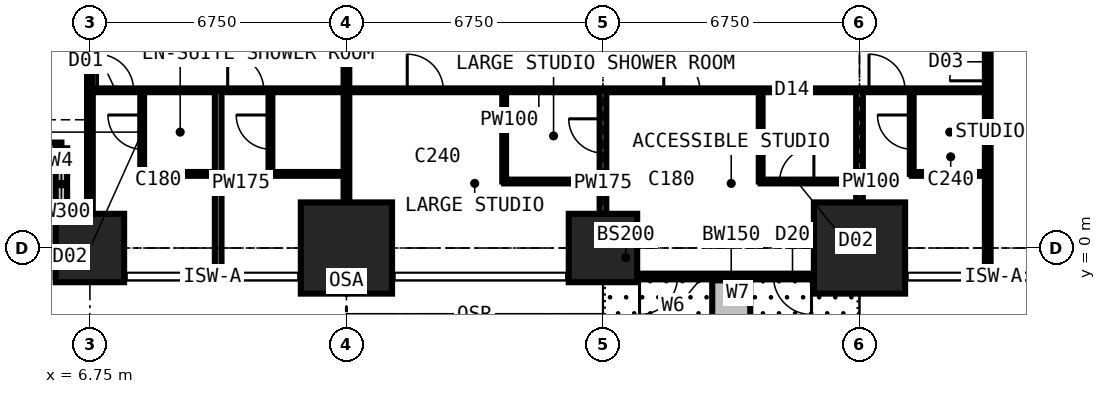
"""IFC4 building model, lengths in metres.
Left out: names, types, materials, properties, quantities, classifications, styles, units other than length and angle.
Written with IfcOpenShell. Run it as: python <this file> out.ifc"""

import sys

from ifc_helpers import new_model, si_unit, direction, frame, frame_2d, origin, origin_2d, place, context, subcontext, project, spatial, rectangle, extrude, element, fill, save


model = new_model("IFC4")
c1 = context("Model", 3, precision=1e-05, world=origin(), true_north=direction((0.0, 1.0)))
c2 = subcontext(c1, "Body", "Model", "MODEL_VIEW")
j1 = project(units=[si_unit("LENGTHUNIT", "METRE"), si_unit("PLANEANGLEUNIT", "RADIAN")], contexts=[c1])
p1 = place(None, origin())
s1 = spatial("IfcSite", under=j1, at=p1, CompositionType="ELEMENT")
p2 = place(p1, origin())
s2 = spatial("IfcBuilding", under=s1, at=p2, CompositionType="ELEMENT")
p3 = place(p2, frame((0.0, 0.0, 72.0)))
s3 = spatial("IfcBuildingStorey", under=s2, at=p3, CompositionType="ELEMENT", Elevation=72.0)
p4 = place(p3, frame((6.75, 0.0, 0.0), z_axis=(0.0, 0.0, 1.0), x_axis=(1.0, 0.0, 0.0)))
e1 = element("IfcColumn", 1, at=p4, inside=s3, PredefinedType="COLUMN", context=c2, shape_type="SweptSolid", body=[
    extrude(rectangle(XDim=1.8, YDim=1.8, at=origin_2d()), origin(), (0.0, 0.0, 1.0), 3.6),
])
p5 = place(p3, frame((13.5, 0.0, 0.0), z_axis=(0.0, 0.0, 1.0), x_axis=(1.0, 0.0, 0.0)))
e2 = element("IfcColumn", 2, at=p5, inside=s3, PredefinedType="COLUMN", context=c2, shape_type="SweptSolid", body=[
    extrude(rectangle(XDim=2.4, YDim=2.4, at=origin_2d()), origin(), (0.0, 0.0, 1.0), 3.6),
])
p6 = place(p3, frame((20.25, 0.0, 0.0), z_axis=(0.0, 0.0, 1.0), x_axis=(1.0, 0.0, 0.0)))
e3 = element("IfcColumn", 3, at=p6, inside=s3, PredefinedType="COLUMN", context=c2, shape_type="SweptSolid", body=[
    extrude(rectangle(XDim=1.8, YDim=1.8, at=origin_2d()), origin(), (0.0, 0.0, 1.0), 3.6),
])
p7 = place(p3, frame((27.0, 0.0, 0.0), z_axis=(0.0, 0.0, 1.0), x_axis=(1.0, 0.0, 0.0)))
e4 = element("IfcColumn", 4, at=p7, inside=s3, PredefinedType="COLUMN", context=c2, shape_type="SweptSolid", body=[
    extrude(rectangle(XDim=2.4, YDim=2.4, at=origin_2d()), origin(), (0.0, 0.0, 1.0), 3.6),
])
p8 = place(p3, frame((2.625, 2.625, 0.0), z_axis=(0.0, 0.0, 1.0), x_axis=(1.0, 0.0, 0.0)))
e5 = element("IfcWall", 5, at=p8, inside=s3, PredefinedType="SOLIDWALL", context=c2, shape_type="SweptSolid", body=[
    extrude(rectangle(XDim=3.375, YDim=0.3, at=frame_2d((1.688, 0.0))), origin(), (0.0, 0.0, 1.0), 3.3),
])
p9 = place(p8, frame((0.788, 0.0, 0.6)))
e6 = element("IfcOpeningElement", 6, at=p9, cuts=e5, PredefinedType="OPENING", context=c2, shape_type="SweptSolid", body=[
    extrude(rectangle(XDim=1.8, YDim=2.1, at=frame_2d((0.9, 1.05))), frame((0.0, 0.16, 0.0), z_axis=(0.0, -1.0, 0.0), x_axis=(1.0, 0.0, 0.0)), (0.0, 0.0, 1.0), 0.32),
])
p10 = place(p3, frame((6.0, 2.625, 0.0), z_axis=(0.0, 0.0, 1.0), x_axis=(0.0, -1.0, 0.0)))
e7 = element("IfcWall", 7, at=p10, inside=s3, PredefinedType="SOLIDWALL", context=c2, shape_type="SweptSolid", body=[
    extrude(rectangle(XDim=3.375, YDim=0.3, at=frame_2d((1.688, 0.0))), origin(), (0.0, 0.0, 1.0), 3.3),
])
p11 = place(p10, frame((0.343, 0.0, 0.9)))
e8 = element("IfcOpeningElement", 8, at=p11, cuts=e7, PredefinedType="OPENING", context=c2, shape_type="SweptSolid", body=[
    extrude(rectangle(XDim=1.2, YDim=1.8, at=frame_2d((0.6, 0.9))), frame((0.0, 0.16, 0.0), z_axis=(0.0, -1.0, 0.0), x_axis=(1.0, 0.0, 0.0)), (0.0, 0.0, 1.0), 0.32),
])
p12 = place(p3, frame((27.0, -0.75, 0.0), z_axis=(0.0, 0.0, 1.0), x_axis=(-1.0, 0.0, 0.0)))
e9 = element("IfcWall", 9, at=p12, inside=s3, PredefinedType="SOLIDWALL", context=c2, shape_type="SweptSolid", body=[
    extrude(rectangle(XDim=6.75, YDim=0.15, at=frame_2d((3.375, 0.0))), origin(), (0.0, 0.0, 1.0), 3.3),
])
p13 = place(p12, frame((1.262, 0.0, 0.0)))
e10 = element("IfcOpeningElement", 10, at=p13, cuts=e9, PredefinedType="OPENING", context=c2, shape_type="SweptSolid", body=[
    extrude(rectangle(XDim=1.0, YDim=2.2, at=frame_2d((0.5, 1.1))), frame((0.0, 0.085, 0.0), z_axis=(0.0, -1.0, 0.0), x_axis=(1.0, 0.0, 0.0)), (0.0, 0.0, 1.0), 0.17),
])
p14 = place(p12, frame((2.325, 0.0, 0.9)))
e11 = element("IfcOpeningElement", 11, at=p14, cuts=e9, PredefinedType="OPENING", context=c2, shape_type="SweptSolid", body=[
    extrude(rectangle(XDim=0.9, YDim=1.8, at=frame_2d((0.45, 0.9))), frame((0.0, 0.085, 0.0), z_axis=(0.0, -1.0, 0.0), x_axis=(1.0, 0.0, 0.0)), (0.0, 0.0, 1.0), 0.17),
])
p15 = place(p12, frame((4.788, 0.0, 0.0)))
e12 = element("IfcOpeningElement", 12, at=p15, cuts=e9, PredefinedType="OPENING", context=c2, shape_type="SweptSolid", body=[
    extrude(rectangle(XDim=1.0, YDim=2.2, at=frame_2d((0.5, 1.1))), frame((0.0, 0.085, 0.0), z_axis=(0.0, -1.0, 0.0), x_axis=(1.0, 0.0, 0.0)), (0.0, 0.0, 1.0), 0.17),
])
p16 = place(p12, frame((3.525, 0.0, 0.9)))
e13 = element("IfcOpeningElement", 13, at=p16, cuts=e9, PredefinedType="OPENING", context=c2, shape_type="SweptSolid", body=[
    extrude(rectangle(XDim=1.2, YDim=1.8, at=frame_2d((0.6, 0.9))), frame((0.0, 0.085, 0.0), z_axis=(0.0, -1.0, 0.0), x_axis=(1.0, 0.0, 0.0)), (0.0, 0.0, 1.0), 0.17),
])
p17 = place(p3, frame((23.625, -0.85, 0.0), z_axis=(0.0, 0.0, 1.0), x_axis=(0.0, -1.0, 0.0)))
e14 = element("IfcWall", 14, at=p17, inside=s3, PredefinedType="USERDEFINED", context=c2, shape_type="SweptSolid", body=[
    extrude(rectangle(XDim=2.2, YDim=1.0, at=frame_2d((1.1, 0.0))), origin(), (0.0, 0.0, 1.0), 0.9),
])
p18 = place(p3, frame((6.75, -0.734, 0.0), z_axis=(0.0, 0.0, 1.0), x_axis=(0.0, 1.0, 0.0)))
e15 = element("IfcWall", 15, at=p18, inside=s3, PredefinedType="PARTITIONING", context=c2, shape_type="SweptSolid", body=[
    extrude(rectangle(XDim=10.859, YDim=0.15, at=frame_2d((5.429, 0.0))), origin(), (0.0, 0.0, 1.0), 2.802),
])
p19 = place(p3, frame((6.75, 4.15, 0.0), z_axis=(0.0, 0.0, 1.0), x_axis=(1.0, 0.0, 0.0)))
e16 = element("IfcWall", 16, at=p19, inside=s3, PredefinedType="PARTITIONING", context=c2, shape_type="SweptSolid", body=[
    extrude(rectangle(XDim=23.625, YDim=0.1, at=frame_2d((11.812, 0.0))), origin(), (0.0, 0.0, 1.0), 3.3),
])
p20 = place(p19, frame((0.2, 0.0, 0.0)))
e17 = element("IfcOpeningElement", 17, at=p20, cuts=e16, PredefinedType="OPENING", context=c2, shape_type="SweptSolid", body=[
    extrude(rectangle(XDim=0.95, YDim=2.2, at=frame_2d((0.475, 1.1))), frame((0.0, 0.06, 0.0), z_axis=(0.0, -1.0, 0.0), x_axis=(1.0, 0.0, 0.0)), (0.0, 0.0, 1.0), 0.12),
])
p21 = place(p19, frame((3.625, 0.0, 0.0)))
e18 = element("IfcOpeningElement", 18, at=p21, cuts=e16, PredefinedType="OPENING", context=c2, shape_type="SweptSolid", body=[
    extrude(rectangle(XDim=0.95, YDim=2.2, at=frame_2d((0.475, 1.1))), frame((0.0, 0.06, 0.0), z_axis=(0.0, -1.0, 0.0), x_axis=(1.0, 0.0, 0.0)), (0.0, 0.0, 1.0), 0.12),
])
p22 = place(p19, frame((15.1, 0.0, 0.0)))
e19 = element("IfcOpeningElement", 19, at=p22, cuts=e16, PredefinedType="OPENING", context=c2, shape_type="SweptSolid", body=[
    extrude(rectangle(XDim=0.95, YDim=2.2, at=frame_2d((0.475, 1.1))), frame((0.0, 0.06, 0.0), z_axis=(0.0, -1.0, 0.0), x_axis=(1.0, 0.0, 0.0)), (0.0, 0.0, 1.0), 0.12),
])
p23 = place(p19, frame((8.35, 0.0, 0.0)))
e20 = element("IfcOpeningElement", 20, at=p23, cuts=e16, PredefinedType="OPENING", context=c2, shape_type="SweptSolid", body=[
    extrude(rectangle(XDim=0.95, YDim=2.2, at=frame_2d((0.475, 1.1))), frame((0.0, 0.06, 0.0), z_axis=(0.0, -1.0, 0.0), x_axis=(1.0, 0.0, 0.0)), (0.0, 0.0, 1.0), 0.12),
])
p24 = place(p19, frame((20.5, 0.0, 0.0)))
e21 = element("IfcOpeningElement", 21, at=p24, cuts=e16, PredefinedType="OPENING", context=c2, shape_type="SweptSolid", body=[
    extrude(rectangle(XDim=0.95, YDim=2.2, at=frame_2d((0.475, 1.1))), frame((0.0, 0.06, 0.0), z_axis=(0.0, -1.0, 0.0), x_axis=(1.0, 0.0, 0.0)), (0.0, 0.0, 1.0), 0.12),
])
p25 = place(p3, frame((8.125, 1.95, 0.0), z_axis=(0.0, 0.0, 1.0), x_axis=(0.0, 1.0, 0.0)))
e22 = element("IfcWall", 22, at=p25, inside=s3, PredefinedType="PARTITIONING", context=c2, shape_type="SweptSolid", body=[
    extrude(rectangle(XDim=2.2, YDim=0.1, at=frame_2d((1.1, 0.0))), origin(), (0.0, 0.0, 1.0), 3.3),
])
p26 = place(p25, frame((0.65, 0.0, 0.0)))
e23 = element("IfcOpeningElement", 23, at=p26, cuts=e22, PredefinedType="OPENING", context=c2, shape_type="SweptSolid", body=[
    extrude(rectangle(XDim=0.9, YDim=2.2, at=frame_2d((0.45, 1.1))), frame((0.0, 0.06, 0.0), z_axis=(0.0, -1.0, 0.0), x_axis=(1.0, 0.0, 0.0)), (0.0, 0.0, 1.0), 0.12),
])
p27 = place(p3, frame((8.125, 1.95, 0.0), z_axis=(0.0, 0.0, 1.0), x_axis=(1.0, 0.0, 0.0)))
e24 = element("IfcWall", 24, at=p27, inside=s3, PredefinedType="PARTITIONING", context=c2, shape_type="SweptSolid", body=[
    extrude(rectangle(XDim=2.0, YDim=0.1, at=frame_2d((1.0, 0.0))), origin(), (0.0, 0.0, 1.0), 3.3),
])
p28 = place(p3, frame((10.125, -0.734, 0.0), z_axis=(0.0, 0.0, 1.0), x_axis=(0.0, 1.0, 0.0)))
e25 = element("IfcWall", 25, at=p28, inside=s3, PredefinedType="PARTITIONING", context=c2, shape_type="SweptSolid", body=[
    extrude(rectangle(XDim=4.884, YDim=0.175, at=frame_2d((2.442, 0.0))), origin(), (0.0, 0.0, 1.0), 3.3),
])
p29 = place(p3, frame((11.5, 1.95, 0.0), z_axis=(0.0, 0.0, 1.0), x_axis=(0.0, 1.0, 0.0)))
e26 = element("IfcWall", 26, at=p29, inside=s3, PredefinedType="PARTITIONING", context=c2, shape_type="SweptSolid", body=[
    extrude(rectangle(XDim=2.2, YDim=0.1, at=frame_2d((1.1, 0.0))), origin(), (0.0, 0.0, 1.0), 3.3),
])
p30 = place(p29, frame((0.65, 0.0, 0.0)))
e27 = element("IfcOpeningElement", 27, at=p30, cuts=e26, PredefinedType="OPENING", context=c2, shape_type="SweptSolid", body=[
    extrude(rectangle(XDim=0.9, YDim=2.2, at=frame_2d((0.45, 1.1))), frame((0.0, 0.06, 0.0), z_axis=(0.0, -1.0, 0.0), x_axis=(1.0, 0.0, 0.0)), (0.0, 0.0, 1.0), 0.12),
])
p31 = place(p3, frame((11.5, 1.95, 0.0), z_axis=(0.0, 0.0, 1.0), x_axis=(1.0, 0.0, 0.0)))
e28 = element("IfcWall", 28, at=p31, inside=s3, PredefinedType="PARTITIONING", context=c2, shape_type="SweptSolid", body=[
    extrude(rectangle(XDim=2.0, YDim=0.1, at=frame_2d((1.0, 0.0))), origin(), (0.0, 0.0, 1.0), 3.3),
])
p32 = place(p3, frame((13.5, -0.734, 0.0), z_axis=(0.0, 0.0, 1.0), x_axis=(0.0, 1.0, 0.0)))
e29 = element("IfcWall", 29, at=p32, inside=s3, PredefinedType="PARTITIONING", context=c2, shape_type="SweptSolid", body=[
    extrude(rectangle(XDim=12.034, YDim=0.15, at=frame_2d((6.017, 0.0))), origin(), (0.0, 0.0, 1.0), 2.802),
])
p33 = place(p3, frame((17.65, 1.75, 0.0), z_axis=(0.0, 0.0, 1.0), x_axis=(0.0, 1.0, 0.0)))
e30 = element("IfcWall", 30, at=p33, inside=s3, PredefinedType="PARTITIONING", context=c2, shape_type="SweptSolid", body=[
    extrude(rectangle(XDim=2.4, YDim=0.1, at=frame_2d((1.2, 0.0))), origin(), (0.0, 0.0, 1.0), 3.3),
])
p34 = place(p3, frame((17.65, 1.75, 0.0), z_axis=(0.0, 0.0, 1.0), x_axis=(1.0, 0.0, 0.0)))
e31 = element("IfcWall", 31, at=p34, inside=s3, PredefinedType="PARTITIONING", context=c2, shape_type="SweptSolid", body=[
    extrude(rectangle(XDim=2.6, YDim=0.1, at=frame_2d((1.3, 0.0))), origin(), (0.0, 0.0, 1.0), 3.3),
])
p35 = place(p3, frame((20.25, -0.734, 0.0), z_axis=(0.0, 0.0, 1.0), x_axis=(0.0, 1.0, 0.0)))
e32 = element("IfcWall", 32, at=p35, inside=s3, PredefinedType="PARTITIONING", context=c2, shape_type="SweptSolid", body=[
    extrude(rectangle(XDim=4.884, YDim=0.175, at=frame_2d((2.442, 0.0))), origin(), (0.0, 0.0, 1.0), 2.802),
])
p36 = place(p35, frame((3.234, 0.0, 0.0)))
e33 = element("IfcOpeningElement", 33, at=p36, cuts=e32, PredefinedType="OPENING", context=c2, shape_type="SweptSolid", body=[
    extrude(rectangle(XDim=0.9, YDim=2.2, at=frame_2d((0.45, 1.1))), frame((0.0, 0.097, 0.0), z_axis=(0.0, -1.0, 0.0), x_axis=(1.0, 0.0, 0.0)), (0.0, 0.0, 1.0), 0.195),
])
p37 = place(p3, frame((24.4, 1.75, 0.0), z_axis=(0.0, 0.0, 1.0), x_axis=(0.0, 1.0, 0.0)))
e34 = element("IfcWall", 34, at=p37, inside=s3, PredefinedType="PARTITIONING", context=c2, shape_type="SweptSolid", body=[
    extrude(rectangle(XDim=2.4, YDim=0.1, at=frame_2d((1.2, 0.0))), origin(), (0.0, 0.0, 1.0), 3.3),
])
p38 = place(p3, frame((24.4, 1.75, 0.0), z_axis=(0.0, 0.0, 1.0), x_axis=(1.0, 0.0, 0.0)))
e35 = element("IfcWall", 35, at=p38, inside=s3, PredefinedType="PARTITIONING", context=c2, shape_type="SweptSolid", body=[
    extrude(rectangle(XDim=2.6, YDim=0.1, at=frame_2d((1.3, 0.0))), origin(), (0.0, 0.0, 1.0), 3.3),
])
p39 = place(p38, frame((0.5, 0.0, 0.0)))
e36 = element("IfcOpeningElement", 36, at=p39, cuts=e35, PredefinedType="OPENING", context=c2, shape_type="SweptSolid", body=[
    extrude(rectangle(XDim=0.9, YDim=2.2, at=frame_2d((0.45, 1.1))), frame((0.0, 0.06, 0.0), z_axis=(0.0, -1.0, 0.0), x_axis=(1.0, 0.0, 0.0)), (0.0, 0.0, 1.0), 0.12),
])
p40 = place(p3, frame((27.0, -0.734, 0.0), z_axis=(0.0, 0.0, 1.0), x_axis=(0.0, 1.0, 0.0)))
e37 = element("IfcWall", 37, at=p40, inside=s3, PredefinedType="PARTITIONING", context=c2, shape_type="SweptSolid", body=[
    extrude(rectangle(XDim=4.884, YDim=0.175, at=frame_2d((2.442, 0.0))), origin(), (0.0, 0.0, 1.0), 2.802),
])
p41 = place(p3, frame((28.375, 1.95, 0.0), z_axis=(0.0, 0.0, 1.0), x_axis=(0.0, 1.0, 0.0)))
e38 = element("IfcWall", 38, at=p41, inside=s3, PredefinedType="PARTITIONING", context=c2, shape_type="SweptSolid", body=[
    extrude(rectangle(XDim=2.2, YDim=0.1, at=frame_2d((1.1, 0.0))), origin(), (0.0, 0.0, 1.0), 3.3),
])
p42 = place(p41, frame((0.65, 0.0, 0.0)))
e39 = element("IfcOpeningElement", 39, at=p42, cuts=e38, PredefinedType="OPENING", context=c2, shape_type="SweptSolid", body=[
    extrude(rectangle(XDim=0.9, YDim=2.2, at=frame_2d((0.45, 1.1))), frame((0.0, 0.06, 0.0), z_axis=(0.0, -1.0, 0.0), x_axis=(1.0, 0.0, 0.0)), (0.0, 0.0, 1.0), 0.12),
])
p43 = place(p3, frame((28.375, 1.95, 0.0), z_axis=(0.0, 0.0, 1.0), x_axis=(1.0, 0.0, 0.0)))
e40 = element("IfcWall", 40, at=p43, inside=s3, PredefinedType="PARTITIONING", context=c2, shape_type="SweptSolid", body=[
    extrude(rectangle(XDim=2.0, YDim=0.1, at=frame_2d((1.0, 0.0))), origin(), (0.0, 0.0, 1.0), 3.3),
])
p44 = place(p3, frame((30.375, -0.734, 0.0), z_axis=(0.0, 0.0, 1.0), x_axis=(0.0, 1.0, 0.0)))
e41 = element("IfcWall", 41, at=p44, inside=s3, PredefinedType="PARTITIONING", context=c2, shape_type="SweptSolid", body=[
    extrude(rectangle(XDim=12.034, YDim=0.15, at=frame_2d((6.017, 0.0))), origin(), (0.0, 0.0, 1.0), 3.3),
])
p45 = place(p44, frame((5.134, 0.0, 0.0)))
e42 = element("IfcOpeningElement", 42, at=p45, cuts=e41, PredefinedType="OPENING", context=c2, shape_type="SweptSolid", body=[
    extrude(rectangle(XDim=1.0, YDim=2.2, at=frame_2d((0.5, 1.1))), frame((0.0, 0.085, 0.0), z_axis=(0.0, -1.0, 0.0), x_axis=(1.0, 0.0, 0.0)), (0.0, 0.0, 1.0), 0.17),
])
p46 = place(p11, origin())
e43 = element("IfcWindow", 43, at=p46, inside=s3, PartitioningType="SINGLE_PANEL", PredefinedType="WINDOW", context=c2, shape_type="SweptSolid", body=[
    extrude(rectangle(XDim=1.2, YDim=1.8, at=frame_2d((0.6, 0.9))), frame((0.0, 0.03, 0.0), z_axis=(0.0, -1.0, 0.0), x_axis=(1.0, 0.0, 0.0)), (0.0, 0.0, 1.0), 0.06),
])
fill(e8, e43)
p47 = place(p13, origin())
e44 = element("IfcDoor", 44, at=p47, inside=s3, OperationType="SINGLE_SWING_LEFT", PredefinedType="DOOR", context=c2, shape_type="SweptSolid", body=[
    extrude(rectangle(XDim=1.0, YDim=2.2, at=frame_2d((0.5, 1.1))), frame((0.0, 0.025, 0.0), z_axis=(0.0, -1.0, 0.0), x_axis=(1.0, 0.0, 0.0)), (0.0, 0.0, 1.0), 0.05),
])
fill(e10, e44)
p48 = place(p14, origin())
e45 = element("IfcWindow", 45, at=p48, inside=s3, PartitioningType="SINGLE_PANEL", PredefinedType="WINDOW", context=c2, shape_type="SweptSolid", body=[
    extrude(rectangle(XDim=0.9, YDim=1.8, at=frame_2d((0.45, 0.9))), frame((0.0, 0.03, 0.0), z_axis=(0.0, -1.0, 0.0), x_axis=(1.0, 0.0, 0.0)), (0.0, 0.0, 1.0), 0.06),
])
fill(e11, e45)
p49 = place(p15, origin())
e46 = element("IfcDoor", 46, at=p49, inside=s3, OperationType="SINGLE_SWING_RIGHT", PredefinedType="DOOR", context=c2, shape_type="SweptSolid", body=[
    extrude(rectangle(XDim=1.0, YDim=2.2, at=frame_2d((0.5, 1.1))), frame((0.0, 0.025, 0.0), z_axis=(0.0, -1.0, 0.0), x_axis=(1.0, 0.0, 0.0)), (0.0, 0.0, 1.0), 0.05),
])
fill(e12, e46)
p50 = place(p16, origin())
e47 = element("IfcWindow", 47, at=p50, inside=s3, PartitioningType="SINGLE_PANEL", PredefinedType="WINDOW", context=c2, shape_type="SweptSolid", body=[
    extrude(rectangle(XDim=1.2, YDim=1.8, at=frame_2d((0.6, 0.9))), frame((0.0, 0.03, 0.0), z_axis=(0.0, -1.0, 0.0), x_axis=(1.0, 0.0, 0.0)), (0.0, 0.0, 1.0), 0.06),
])
fill(e13, e47)
p51 = place(p20, origin())
e48 = element("IfcDoor", 48, at=p51, inside=s3, OperationType="SINGLE_SWING_LEFT", PredefinedType="DOOR", context=c2, shape_type="SweptSolid", body=[
    extrude(rectangle(XDim=0.95, YDim=2.2, at=frame_2d((0.475, 1.1))), frame((0.0, 0.025, 0.0), z_axis=(0.0, -1.0, 0.0), x_axis=(1.0, 0.0, 0.0)), (0.0, 0.0, 1.0), 0.05),
])
fill(e17, e48)
p52 = place(p26, origin())
e49 = element("IfcDoor", 49, at=p52, inside=s3, OperationType="SINGLE_SWING_RIGHT", PredefinedType="DOOR", context=c2, shape_type="SweptSolid", body=[
    extrude(rectangle(XDim=0.9, YDim=2.2, at=frame_2d((0.45, 1.1))), frame((0.0, 0.025, 0.0), z_axis=(0.0, -1.0, 0.0), x_axis=(1.0, 0.0, 0.0)), (0.0, 0.0, 1.0), 0.05),
])
fill(e23, e49)
p53 = place(p21, origin())
e50 = element("IfcDoor", 50, at=p53, inside=s3, OperationType="SINGLE_SWING_LEFT", PredefinedType="DOOR", context=c2, shape_type="SweptSolid", body=[
    extrude(rectangle(XDim=0.95, YDim=2.2, at=frame_2d((0.475, 1.1))), frame((0.0, 0.025, 0.0), z_axis=(0.0, -1.0, 0.0), x_axis=(1.0, 0.0, 0.0)), (0.0, 0.0, 1.0), 0.05),
])
fill(e18, e50)
p54 = place(p30, origin())
e51 = element("IfcDoor", 51, at=p54, inside=s3, OperationType="SINGLE_SWING_RIGHT", PredefinedType="DOOR", context=c2, shape_type="SweptSolid", body=[
    extrude(rectangle(XDim=0.9, YDim=2.2, at=frame_2d((0.45, 1.1))), frame((0.0, 0.025, 0.0), z_axis=(0.0, -1.0, 0.0), x_axis=(1.0, 0.0, 0.0)), (0.0, 0.0, 1.0), 0.05),
])
fill(e27, e51)
p55 = place(p22, origin())
e52 = element("IfcDoor", 52, at=p55, inside=s3, OperationType="SINGLE_SWING_LEFT", PredefinedType="DOOR", context=c2, shape_type="SweptSolid", body=[
    extrude(rectangle(XDim=0.95, YDim=2.2, at=frame_2d((0.475, 1.1))), frame((0.0, 0.025, 0.0), z_axis=(0.0, -1.0, 0.0), x_axis=(1.0, 0.0, 0.0)), (0.0, 0.0, 1.0), 0.05),
])
fill(e19, e52)
p56 = place(p39, origin())
e53 = element("IfcDoor", 53, at=p56, inside=s3, OperationType="SINGLE_SWING_RIGHT", PredefinedType="DOOR", context=c2, shape_type="SweptSolid", body=[
    extrude(rectangle(XDim=0.9, YDim=2.2, at=frame_2d((0.45, 1.1))), frame((0.0, 0.025, 0.0), z_axis=(0.0, -1.0, 0.0), x_axis=(1.0, 0.0, 0.0)), (0.0, 0.0, 1.0), 0.05),
])
fill(e36, e53)
p57 = place(p23, origin())
e54 = element("IfcDoor", 54, at=p57, inside=s3, OperationType="SINGLE_SWING_LEFT", PredefinedType="DOOR", context=c2, shape_type="SweptSolid", body=[
    extrude(rectangle(XDim=0.95, YDim=2.2, at=frame_2d((0.475, 1.1))), frame((0.0, 0.025, 0.0), z_axis=(0.0, -1.0, 0.0), x_axis=(1.0, 0.0, 0.0)), (0.0, 0.0, 1.0), 0.05),
])
fill(e20, e54)
p58 = place(p36, origin())
e55 = element("IfcDoor", 55, at=p58, inside=s3, OperationType="SINGLE_SWING_RIGHT", PredefinedType="DOOR", context=c2, shape_type="SweptSolid", body=[
    extrude(rectangle(XDim=0.9, YDim=2.2, at=frame_2d((0.45, 1.1))), frame((0.0, 0.025, 0.0), z_axis=(0.0, -1.0, 0.0), x_axis=(1.0, 0.0, 0.0)), (0.0, 0.0, 1.0), 0.05),
])
fill(e33, e55)
p59 = place(p24, origin())
e56 = element("IfcDoor", 56, at=p59, inside=s3, OperationType="SINGLE_SWING_LEFT", PredefinedType="DOOR", context=c2, shape_type="SweptSolid", body=[
    extrude(rectangle(XDim=0.95, YDim=2.2, at=frame_2d((0.475, 1.1))), frame((0.0, 0.025, 0.0), z_axis=(0.0, -1.0, 0.0), x_axis=(1.0, 0.0, 0.0)), (0.0, 0.0, 1.0), 0.05),
])
fill(e21, e56)
p60 = place(p42, origin())
e57 = element("IfcDoor", 57, at=p60, inside=s3, OperationType="SINGLE_SWING_RIGHT", PredefinedType="DOOR", context=c2, shape_type="SweptSolid", body=[
    extrude(rectangle(XDim=0.9, YDim=2.2, at=frame_2d((0.45, 1.1))), frame((0.0, 0.025, 0.0), z_axis=(0.0, -1.0, 0.0), x_axis=(1.0, 0.0, 0.0)), (0.0, 0.0, 1.0), 0.05),
])
fill(e39, e57)
p61 = place(p45, origin())
e58 = element("IfcDoor", 58, at=p61, inside=s3, OperationType="SINGLE_SWING_LEFT", PredefinedType="DOOR", context=c2, shape_type="SweptSolid", body=[
    extrude(rectangle(XDim=1.0, YDim=2.2, at=frame_2d((0.5, 1.1))), frame((0.0, 0.025, 0.0), z_axis=(0.0, -1.0, 0.0), x_axis=(1.0, 0.0, 0.0)), (0.0, 0.0, 1.0), 0.05),
])
fill(e42, e58)
save(model, sys.argv[1])
